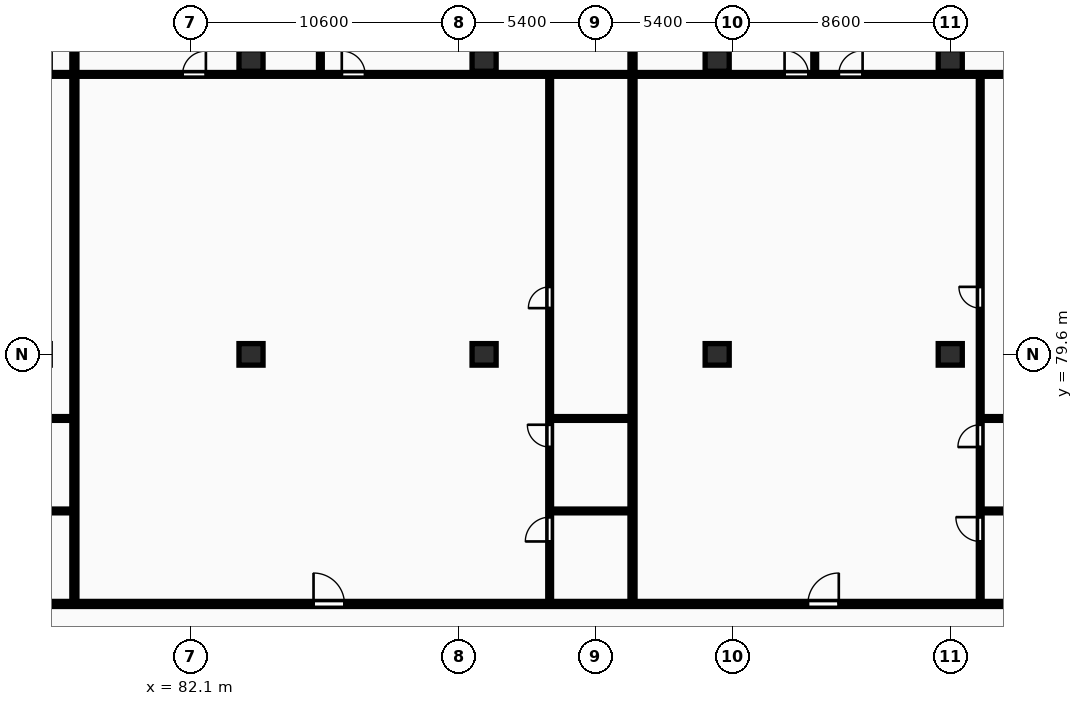
"""IFC4 building model, lengths in metres.
Left out: names, types, materials, properties, quantities, classifications, styles, units other than length and angle.
Written with IfcOpenShell. Run it as: python <this file> out.ifc"""

import sys

from ifc_helpers import new_model, si_unit, direction, frame, frame_2d, origin, origin_2d, place, context, subcontext, project, spatial, rectangle, extrude, element, fill, save


model = new_model("IFC4")
c1 = context("Model", 3, precision=1e-05, world=origin(), true_north=direction((0.0, 1.0)))
c2 = subcontext(c1, "Body", "Model", "MODEL_VIEW")
j1 = project(units=[si_unit("LENGTHUNIT", "METRE"), si_unit("PLANEANGLEUNIT", "RADIAN")], contexts=[c1])
p1 = place(None, origin())
s1 = spatial("IfcSite", under=j1, at=p1, CompositionType="ELEMENT")
p2 = place(p1, origin())
s2 = spatial("IfcBuilding", under=s1, at=p2, CompositionType="ELEMENT")
p3 = place(p2, frame((0.0, 0.0, 93.8)))
s3 = spatial("IfcBuildingStorey", under=s2, at=p3, CompositionType="ELEMENT", Elevation=93.8)
for number, where, z_axis, x_axis in (
    (1, (84.5, 79.6, 0.0), (0.0, 0.0, 1.0), (1.0, 0.0, 0.0)),
    (2, (84.5, 91.2, 0.0), (0.0, 0.0, 1.0), (1.0, 0.0, 0.0)),
    (3, (93.7, 79.6, 0.0), (0.0, 0.0, 1.0), (1.0, 0.0, 0.0)),
    (4, (93.7, 91.2, 0.0), (0.0, 0.0, 1.0), (1.0, 0.0, 0.0)),
    (5, (102.9, 79.6, 0.0), (0.0, 0.0, 1.0), (1.0, 0.0, 0.0)),
    (6, (102.9, 91.2, 0.0), (0.0, 0.0, 1.0), (1.0, 0.0, 0.0)),
    (7, (112.1, 79.6, 0.0), (0.0, 0.0, 1.0), (1.0, 0.0, 0.0)),
    (8, (112.1, 91.2, 0.0), (0.0, 0.0, 1.0), (1.0, 0.0, 0.0)),
):
    element("IfcColumn", number, at=place(p3, frame(where, z_axis=z_axis, x_axis=x_axis)), inside=s3, PredefinedType="COLUMN", context=c2, shape_type="SweptSolid", body=[
        extrude(rectangle(XDim=0.95, YDim=0.85, at=origin_2d()), origin(), (0.0, 0.0, 1.0), 3.25),
    ])
p4 = place(p3, frame((77.528, 69.83, 0.0), z_axis=(0.0, 0.0, 1.0), x_axis=(0.0, 1.0, 0.0)))
e9 = element("IfcWall", 9, at=p4, inside=s3, PredefinedType="PARTITIONING", context=c2, shape_type="SweptSolid", body=[
    extrude(rectangle(XDim=26.07, YDim=0.2, at=frame_2d((13.035, 0.0))), origin(), (0.0, 0.0, 1.0), 2.97),
])
p5 = place(p3, frame((74.088, 73.42, 0.0), z_axis=(0.0, 0.0, 1.0), x_axis=(1.0, 0.0, 0.0)))
e10 = element("IfcWall", 10, at=p5, inside=s3, PredefinedType="PARTITIONING", context=c2, shape_type="SweptSolid", body=[
    extrude(rectangle(XDim=3.36, YDim=0.15, at=frame_2d((1.68, 0.0))), origin(), (0.0, 0.0, 1.0), 2.561),
])
p6 = place(p3, frame((74.088, 77.07, 0.0), z_axis=(0.0, 0.0, 1.0), x_axis=(1.0, 0.0, 0.0)))
e11 = element("IfcWall", 11, at=p6, inside=s3, PredefinedType="PARTITIONING", context=c2, shape_type="SweptSolid", body=[
    extrude(rectangle(XDim=3.36, YDim=0.15, at=frame_2d((1.68, 0.0))), origin(), (0.0, 0.0, 1.0), 2.97),
])
p7 = place(p3, frame((57.68, 90.65, 0.0), z_axis=(0.0, 0.0, 1.0), x_axis=(1.0, 0.0, 0.0)))
e12 = element("IfcWall", 12, at=p7, inside=s3, PredefinedType="PARTITIONING", context=c2, shape_type="SweptSolid", body=[
    extrude(rectangle(XDim=19.769, YDim=0.15, at=frame_2d((9.884, 0.0))), origin(), (0.0, 0.0, 1.0), 2.97),
])
p8 = place(p7, frame((7.294, 0.0, 0.0)))
e13 = element("IfcOpeningElement", 13, at=p8, cuts=e12, PredefinedType="OPENING", context=c2, shape_type="SweptSolid", body=[
    extrude(rectangle(XDim=0.92, YDim=2.08, at=frame_2d((0.46, 1.04))), frame((0.0, 0.085, 0.0), z_axis=(0.0, -1.0, 0.0), x_axis=(1.0, 0.0, 0.0)), (0.0, 0.0, 1.0), 0.17),
])
p9 = place(p7, frame((12.076, 0.0, 0.0)))
e14 = element("IfcOpeningElement", 14, at=p9, cuts=e12, PredefinedType="OPENING", context=c2, shape_type="SweptSolid", body=[
    extrude(rectangle(XDim=0.92, YDim=2.08, at=frame_2d((0.46, 1.04))), frame((0.0, 0.085, 0.0), z_axis=(0.0, -1.0, 0.0), x_axis=(1.0, 0.0, 0.0)), (0.0, 0.0, 1.0), 0.17),
])
p10 = place(p3, frame((99.558, 69.83, 0.0), z_axis=(0.0, 0.0, 1.0), x_axis=(0.0, 1.0, 0.0)))
e15 = element("IfcWall", 15, at=p10, inside=s3, PredefinedType="PARTITIONING", context=c2, shape_type="SweptSolid", body=[
    extrude(rectangle(XDim=26.07, YDim=0.2, at=frame_2d((13.035, 0.0))), origin(), (0.0, 0.0, 1.0), 2.97),
])
p11 = place(p3, frame((96.348, 73.42, 0.0), z_axis=(0.0, 0.0, 1.0), x_axis=(1.0, 0.0, 0.0)))
e16 = element("IfcWall", 16, at=p11, inside=s3, PredefinedType="PARTITIONING", context=c2, shape_type="SweptSolid", body=[
    extrude(rectangle(XDim=3.13, YDim=0.15, at=frame_2d((1.565, 0.0))), origin(), (0.0, 0.0, 1.0), 2.561),
])
p12 = place(p3, frame((96.348, 77.07, 0.0), z_axis=(0.0, 0.0, 1.0), x_axis=(1.0, 0.0, 0.0)))
e17 = element("IfcWall", 17, at=p12, inside=s3, PredefinedType="PARTITIONING", context=c2, shape_type="SweptSolid", body=[
    extrude(rectangle(XDim=3.13, YDim=0.15, at=frame_2d((1.565, 0.0))), origin(), (0.0, 0.0, 1.0), 2.97),
])
p13 = place(p3, frame((96.288, 69.81, 0.0), z_axis=(0.0, 0.0, 1.0), x_axis=(0.0, 1.0, 0.0)))
e18 = element("IfcWall", 18, at=p13, inside=s3, PredefinedType="PARTITIONING", context=c2, shape_type="SweptSolid", body=[
    extrude(rectangle(XDim=20.78, YDim=0.15, at=frame_2d((10.39, 0.0))), origin(), (0.0, 0.0, 1.0), 2.97),
])
p14 = place(p13, frame((2.406, 0.0, 0.0)))
e19 = element("IfcOpeningElement", 19, at=p14, cuts=e18, PredefinedType="OPENING", context=c2, shape_type="SweptSolid", body=[
    extrude(rectangle(XDim=0.96, YDim=2.1, at=frame_2d((0.48, 1.05))), frame((0.0, 0.085, 0.0), z_axis=(0.0, -1.0, 0.0), x_axis=(1.0, 0.0, 0.0)), (0.0, 0.0, 1.0), 0.17),
])
p15 = place(p13, frame((6.133, 0.0, 0.0)))
e20 = element("IfcOpeningElement", 20, at=p15, cuts=e18, PredefinedType="OPENING", context=c2, shape_type="SweptSolid", body=[
    extrude(rectangle(XDim=0.88, YDim=2.06, at=frame_2d((0.44, 1.03))), frame((0.0, 0.085, 0.0), z_axis=(0.0, -1.0, 0.0), x_axis=(1.0, 0.0, 0.0)), (0.0, 0.0, 1.0), 0.17),
])
p16 = place(p13, frame((11.615, 0.0, 0.0)))
e21 = element("IfcOpeningElement", 21, at=p16, cuts=e18, PredefinedType="OPENING", context=c2, shape_type="SweptSolid", body=[
    extrude(rectangle(XDim=0.84, YDim=2.04, at=frame_2d((0.42, 1.02))), frame((0.0, 0.085, 0.0), z_axis=(0.0, -1.0, 0.0), x_axis=(1.0, 0.0, 0.0)), (0.0, 0.0, 1.0), 0.17),
])
p17 = place(p3, frame((87.238, 90.73, 0.0), z_axis=(0.0, 0.0, 1.0), x_axis=(0.0, 1.0, 0.0)))
e22 = element("IfcWall", 22, at=p17, inside=s3, PredefinedType="PARTITIONING", context=c2, shape_type="SweptSolid", body=[
    extrude(rectangle(XDim=5.17, YDim=0.15, at=frame_2d((2.585, 0.0))), origin(), (0.0, 0.0, 1.0), 2.97),
])
p18 = place(p3, frame((77.608, 90.65, 0.0), z_axis=(0.0, 0.0, 1.0), x_axis=(1.0, 0.0, 0.0)))
e23 = element("IfcWall", 23, at=p18, inside=s3, PredefinedType="PARTITIONING", context=c2, shape_type="SweptSolid", body=[
    extrude(rectangle(XDim=21.87, YDim=0.15, at=frame_2d((10.935, 0.0))), origin(), (0.0, 0.0, 1.0), 2.97),
])
p19 = place(p18, frame((4.191, 0.0, 0.0)))
e24 = element("IfcOpeningElement", 24, at=p19, cuts=e23, PredefinedType="OPENING", context=c2, shape_type="SweptSolid", body=[
    extrude(rectangle(XDim=0.92, YDim=2.08, at=frame_2d((0.46, 1.04))), frame((0.0, 0.085, 0.0), z_axis=(0.0, -1.0, 0.0), x_axis=(1.0, 0.0, 0.0)), (0.0, 0.0, 1.0), 0.17),
])
p20 = place(p18, frame((10.475, 0.0, 0.0)))
e25 = element("IfcOpeningElement", 25, at=p20, cuts=e23, PredefinedType="OPENING", context=c2, shape_type="SweptSolid", body=[
    extrude(rectangle(XDim=0.92, YDim=2.08, at=frame_2d((0.46, 1.04))), frame((0.0, 0.085, 0.0), z_axis=(0.0, -1.0, 0.0), x_axis=(1.0, 0.0, 0.0)), (0.0, 0.0, 1.0), 0.17),
])
p21 = place(p3, frame((113.343, 73.42, 0.0), z_axis=(0.0, 0.0, 1.0), x_axis=(1.0, 0.0, 0.0)))
e26 = element("IfcWall", 26, at=p21, inside=s3, PredefinedType="PARTITIONING", context=c2, shape_type="SweptSolid", body=[
    extrude(rectangle(XDim=3.36, YDim=0.15, at=frame_2d((1.68, 0.0))), origin(), (0.0, 0.0, 1.0), 2.561),
])
p22 = place(p3, frame((113.343, 77.07, 0.0), z_axis=(0.0, 0.0, 1.0), x_axis=(1.0, 0.0, 0.0)))
e27 = element("IfcWall", 27, at=p22, inside=s3, PredefinedType="PARTITIONING", context=c2, shape_type="SweptSolid", body=[
    extrude(rectangle(XDim=3.36, YDim=0.15, at=frame_2d((1.68, 0.0))), origin(), (0.0, 0.0, 1.0), 2.97),
])
p23 = place(p3, frame((113.283, 69.81, 0.0), z_axis=(0.0, 0.0, 1.0), x_axis=(0.0, 1.0, 0.0)))
e28 = element("IfcWall", 28, at=p23, inside=s3, PredefinedType="PARTITIONING", context=c2, shape_type="SweptSolid", body=[
    extrude(rectangle(XDim=20.78, YDim=0.15, at=frame_2d((10.39, 0.0))), origin(), (0.0, 0.0, 1.0), 2.97),
])
p24 = place(p23, frame((2.406, 0.0, 0.0)))
e29 = element("IfcOpeningElement", 29, at=p24, cuts=e28, PredefinedType="OPENING", context=c2, shape_type="SweptSolid", body=[
    extrude(rectangle(XDim=0.96, YDim=2.1, at=frame_2d((0.48, 1.05))), frame((0.0, 0.085, 0.0), z_axis=(0.0, -1.0, 0.0), x_axis=(1.0, 0.0, 0.0)), (0.0, 0.0, 1.0), 0.17),
])
p25 = place(p23, frame((6.133, 0.0, 0.0)))
e30 = element("IfcOpeningElement", 30, at=p25, cuts=e28, PredefinedType="OPENING", context=c2, shape_type="SweptSolid", body=[
    extrude(rectangle(XDim=0.88, YDim=2.06, at=frame_2d((0.44, 1.03))), frame((0.0, 0.085, 0.0), z_axis=(0.0, -1.0, 0.0), x_axis=(1.0, 0.0, 0.0)), (0.0, 0.0, 1.0), 0.17),
])
p26 = place(p23, frame((11.615, 0.0, 0.0)))
e31 = element("IfcOpeningElement", 31, at=p26, cuts=e28, PredefinedType="OPENING", context=c2, shape_type="SweptSolid", body=[
    extrude(rectangle(XDim=0.84, YDim=2.04, at=frame_2d((0.42, 1.02))), frame((0.0, 0.085, 0.0), z_axis=(0.0, -1.0, 0.0), x_axis=(1.0, 0.0, 0.0)), (0.0, 0.0, 1.0), 0.17),
])
p27 = place(p3, frame((106.75, 90.73, 0.0), z_axis=(0.0, 0.0, 1.0), x_axis=(0.0, 1.0, 0.0)))
e32 = element("IfcWall", 32, at=p27, inside=s3, PredefinedType="PARTITIONING", context=c2, shape_type="SweptSolid", body=[
    extrude(rectangle(XDim=5.17, YDim=0.15, at=frame_2d((2.585, 0.0))), origin(), (0.0, 0.0, 1.0), 2.97),
])
p28 = place(p3, frame((99.638, 90.65, 0.0), z_axis=(0.0, 0.0, 1.0), x_axis=(1.0, 0.0, 0.0)))
e33 = element("IfcWall", 33, at=p28, inside=s3, PredefinedType="PARTITIONING", context=c2, shape_type="SweptSolid", body=[
    extrude(rectangle(XDim=17.065, YDim=0.15, at=frame_2d((8.532, 0.0))), origin(), (0.0, 0.0, 1.0), 2.97),
])
p29 = place(p28, frame((5.922, 0.0, 0.0)))
e34 = element("IfcOpeningElement", 34, at=p29, cuts=e33, PredefinedType="OPENING", context=c2, shape_type="SweptSolid", body=[
    extrude(rectangle(XDim=0.94, YDim=2.1, at=frame_2d((0.47, 1.05))), frame((0.0, 0.085, 0.0), z_axis=(0.0, -1.0, 0.0), x_axis=(1.0, 0.0, 0.0)), (0.0, 0.0, 1.0), 0.17),
])
p30 = place(p28, frame((8.062, 0.0, 0.0)))
e35 = element("IfcOpeningElement", 35, at=p30, cuts=e33, PredefinedType="OPENING", context=c2, shape_type="SweptSolid", body=[
    extrude(rectangle(XDim=0.94, YDim=2.1, at=frame_2d((0.47, 1.05))), frame((0.0, 0.085, 0.0), z_axis=(0.0, -1.0, 0.0), x_axis=(1.0, 0.0, 0.0)), (0.0, 0.0, 1.0), 0.17),
])
p31 = place(p3, frame((57.6, 69.75, 0.0), z_axis=(0.0, 0.0, 1.0), x_axis=(1.0, 0.0, 0.0)))
e36 = element("IfcWall", 36, at=p31, inside=s3, PredefinedType="PARTITIONING", context=c2, shape_type="SweptSolid", body=[
    extrude(rectangle(XDim=73.0, YDim=0.2, at=frame_2d((36.5, 0.0))), origin(), (0.0, 0.0, 1.0), 2.97),
])
p32 = place(p31, frame((7.372, 0.0, 0.0)))
e37 = element("IfcOpeningElement", 37, at=p32, cuts=e36, PredefinedType="OPENING", context=c2, shape_type="SweptSolid", body=[
    extrude(rectangle(XDim=1.22, YDim=2.18, at=frame_2d((0.61, 1.09))), frame((0.0, 0.11, 0.0), z_axis=(0.0, -1.0, 0.0), x_axis=(1.0, 0.0, 0.0)), (0.0, 0.0, 1.0), 0.22),
])
p33 = place(p31, frame((29.368, 0.0, 0.0)))
e38 = element("IfcOpeningElement", 38, at=p33, cuts=e36, PredefinedType="OPENING", context=c2, shape_type="SweptSolid", body=[
    extrude(rectangle(XDim=1.22, YDim=2.18, at=frame_2d((0.61, 1.09))), frame((0.0, 0.11, 0.0), z_axis=(0.0, -1.0, 0.0), x_axis=(1.0, 0.0, 0.0)), (0.0, 0.0, 1.0), 0.22),
])
p34 = place(p31, frame((48.88, 0.0, 0.0)))
e39 = element("IfcOpeningElement", 39, at=p34, cuts=e36, PredefinedType="OPENING", context=c2, shape_type="SweptSolid", body=[
    extrude(rectangle(XDim=1.22, YDim=2.18, at=frame_2d((0.61, 1.09))), frame((0.0, 0.11, 0.0), z_axis=(0.0, -1.0, 0.0), x_axis=(1.0, 0.0, 0.0)), (0.0, 0.0, 1.0), 0.22),
])
p35 = place(p31, frame((60.081, 0.0, 0.0)))
e40 = element("IfcOpeningElement", 40, at=p35, cuts=e36, PredefinedType="OPENING", context=c2, shape_type="SweptSolid", body=[
    extrude(rectangle(XDim=0.95, YDim=2.15, at=frame_2d((0.475, 1.075))), frame((0.0, 0.11, 0.0), z_axis=(0.0, -1.0, 0.0), x_axis=(1.0, 0.0, 0.0)), (0.0, 0.0, 1.0), 0.22),
])
p36 = place(p14, origin())
e41 = element("IfcDoor", 41, at=p36, inside=s3, OperationType="SINGLE_SWING_LEFT", PredefinedType="DOOR", context=c2, shape_type="SweptSolid", body=[
    extrude(rectangle(XDim=0.96, YDim=2.1, at=frame_2d((0.48, 1.05))), frame((0.0, 0.025, 0.0), z_axis=(0.0, -1.0, 0.0), x_axis=(1.0, 0.0, 0.0)), (0.0, 0.0, 1.0), 0.05),
])
fill(e19, e41)
p37 = place(p15, origin())
e42 = element("IfcDoor", 42, at=p37, inside=s3, OperationType="SINGLE_SWING_RIGHT", PredefinedType="DOOR", context=c2, shape_type="SweptSolid", body=[
    extrude(rectangle(XDim=0.88, YDim=2.06, at=frame_2d((0.44, 1.03))), frame((0.0, 0.025, 0.0), z_axis=(0.0, -1.0, 0.0), x_axis=(1.0, 0.0, 0.0)), (0.0, 0.0, 1.0), 0.05),
])
fill(e20, e42)
p38 = place(p16, origin())
e43 = element("IfcDoor", 43, at=p38, inside=s3, OperationType="SINGLE_SWING_LEFT", PredefinedType="DOOR", context=c2, shape_type="SweptSolid", body=[
    extrude(rectangle(XDim=0.84, YDim=2.04, at=frame_2d((0.42, 1.02))), frame((0.0, 0.025, 0.0), z_axis=(0.0, -1.0, 0.0), x_axis=(1.0, 0.0, 0.0)), (0.0, 0.0, 1.0), 0.05),
])
fill(e21, e43)
p39 = place(p19, origin())
e44 = element("IfcDoor", 44, at=p39, inside=s3, OperationType="SINGLE_SWING_RIGHT", PredefinedType="DOOR", context=c2, shape_type="SweptSolid", body=[
    extrude(rectangle(XDim=0.92, YDim=2.08, at=frame_2d((0.46, 1.04))), frame((0.0, 0.025, 0.0), z_axis=(0.0, -1.0, 0.0), x_axis=(1.0, 0.0, 0.0)), (0.0, 0.0, 1.0), 0.05),
])
fill(e24, e44)
p40 = place(p20, origin())
e45 = element("IfcDoor", 45, at=p40, inside=s3, OperationType="SINGLE_SWING_LEFT", PredefinedType="DOOR", context=c2, shape_type="SweptSolid", body=[
    extrude(rectangle(XDim=0.92, YDim=2.08, at=frame_2d((0.46, 1.04))), frame((0.0, 0.025, 0.0), z_axis=(0.0, -1.0, 0.0), x_axis=(1.0, 0.0, 0.0)), (0.0, 0.0, 1.0), 0.05),
])
fill(e25, e45)
p41 = place(p24, origin())
e46 = element("IfcDoor", 46, at=p41, inside=s3, OperationType="SINGLE_SWING_RIGHT", PredefinedType="DOOR", context=c2, shape_type="SweptSolid", body=[
    extrude(rectangle(XDim=0.96, YDim=2.1, at=frame_2d((0.48, 1.05))), frame((0.0, 0.025, 0.0), z_axis=(0.0, -1.0, 0.0), x_axis=(1.0, 0.0, 0.0)), (0.0, 0.0, 1.0), 0.05),
])
fill(e29, e46)
p42 = place(p25, origin())
e47 = element("IfcDoor", 47, at=p42, inside=s3, OperationType="SINGLE_SWING_LEFT", PredefinedType="DOOR", context=c2, shape_type="SweptSolid", body=[
    extrude(rectangle(XDim=0.88, YDim=2.06, at=frame_2d((0.44, 1.03))), frame((0.0, 0.025, 0.0), z_axis=(0.0, -1.0, 0.0), x_axis=(1.0, 0.0, 0.0)), (0.0, 0.0, 1.0), 0.05),
])
fill(e30, e47)
p43 = place(p26, origin())
e48 = element("IfcDoor", 48, at=p43, inside=s3, OperationType="SINGLE_SWING_RIGHT", PredefinedType="DOOR", context=c2, shape_type="SweptSolid", body=[
    extrude(rectangle(XDim=0.84, YDim=2.04, at=frame_2d((0.42, 1.02))), frame((0.0, 0.025, 0.0), z_axis=(0.0, -1.0, 0.0), x_axis=(1.0, 0.0, 0.0)), (0.0, 0.0, 1.0), 0.05),
])
fill(e31, e48)
p44 = place(p29, origin())
e49 = element("IfcDoor", 49, at=p44, inside=s3, OperationType="SINGLE_SWING_LEFT", PredefinedType="DOOR", context=c2, shape_type="SweptSolid", body=[
    extrude(rectangle(XDim=0.94, YDim=2.1, at=frame_2d((0.47, 1.05))), frame((0.0, 0.025, 0.0), z_axis=(0.0, -1.0, 0.0), x_axis=(1.0, 0.0, 0.0)), (0.0, 0.0, 1.0), 0.05),
])
fill(e34, e49)
p45 = place(p30, origin())
e50 = element("IfcDoor", 50, at=p45, inside=s3, OperationType="SINGLE_SWING_RIGHT", PredefinedType="DOOR", context=c2, shape_type="SweptSolid", body=[
    extrude(rectangle(XDim=0.94, YDim=2.1, at=frame_2d((0.47, 1.05))), frame((0.0, 0.025, 0.0), z_axis=(0.0, -1.0, 0.0), x_axis=(1.0, 0.0, 0.0)), (0.0, 0.0, 1.0), 0.05),
])
fill(e35, e50)
p46 = place(p33, origin())
e51 = element("IfcDoor", 51, at=p46, inside=s3, OperationType="SINGLE_SWING_LEFT", PredefinedType="DOOR", context=c2, shape_type="SweptSolid", body=[
    extrude(rectangle(XDim=1.22, YDim=2.18, at=frame_2d((0.61, 1.09))), frame((0.0, 0.025, 0.0), z_axis=(0.0, -1.0, 0.0), x_axis=(1.0, 0.0, 0.0)), (0.0, 0.0, 1.0), 0.05),
])
fill(e38, e51)
p47 = place(p34, origin())
e52 = element("IfcDoor", 52, at=p47, inside=s3, OperationType="SINGLE_SWING_RIGHT", PredefinedType="DOOR", context=c2, shape_type="SweptSolid", body=[
    extrude(rectangle(XDim=1.22, YDim=2.18, at=frame_2d((0.61, 1.09))), frame((0.0, 0.025, 0.0), z_axis=(0.0, -1.0, 0.0), x_axis=(1.0, 0.0, 0.0)), (0.0, 0.0, 1.0), 0.05),
])
fill(e39, e52)
save(model, sys.argv[1])
